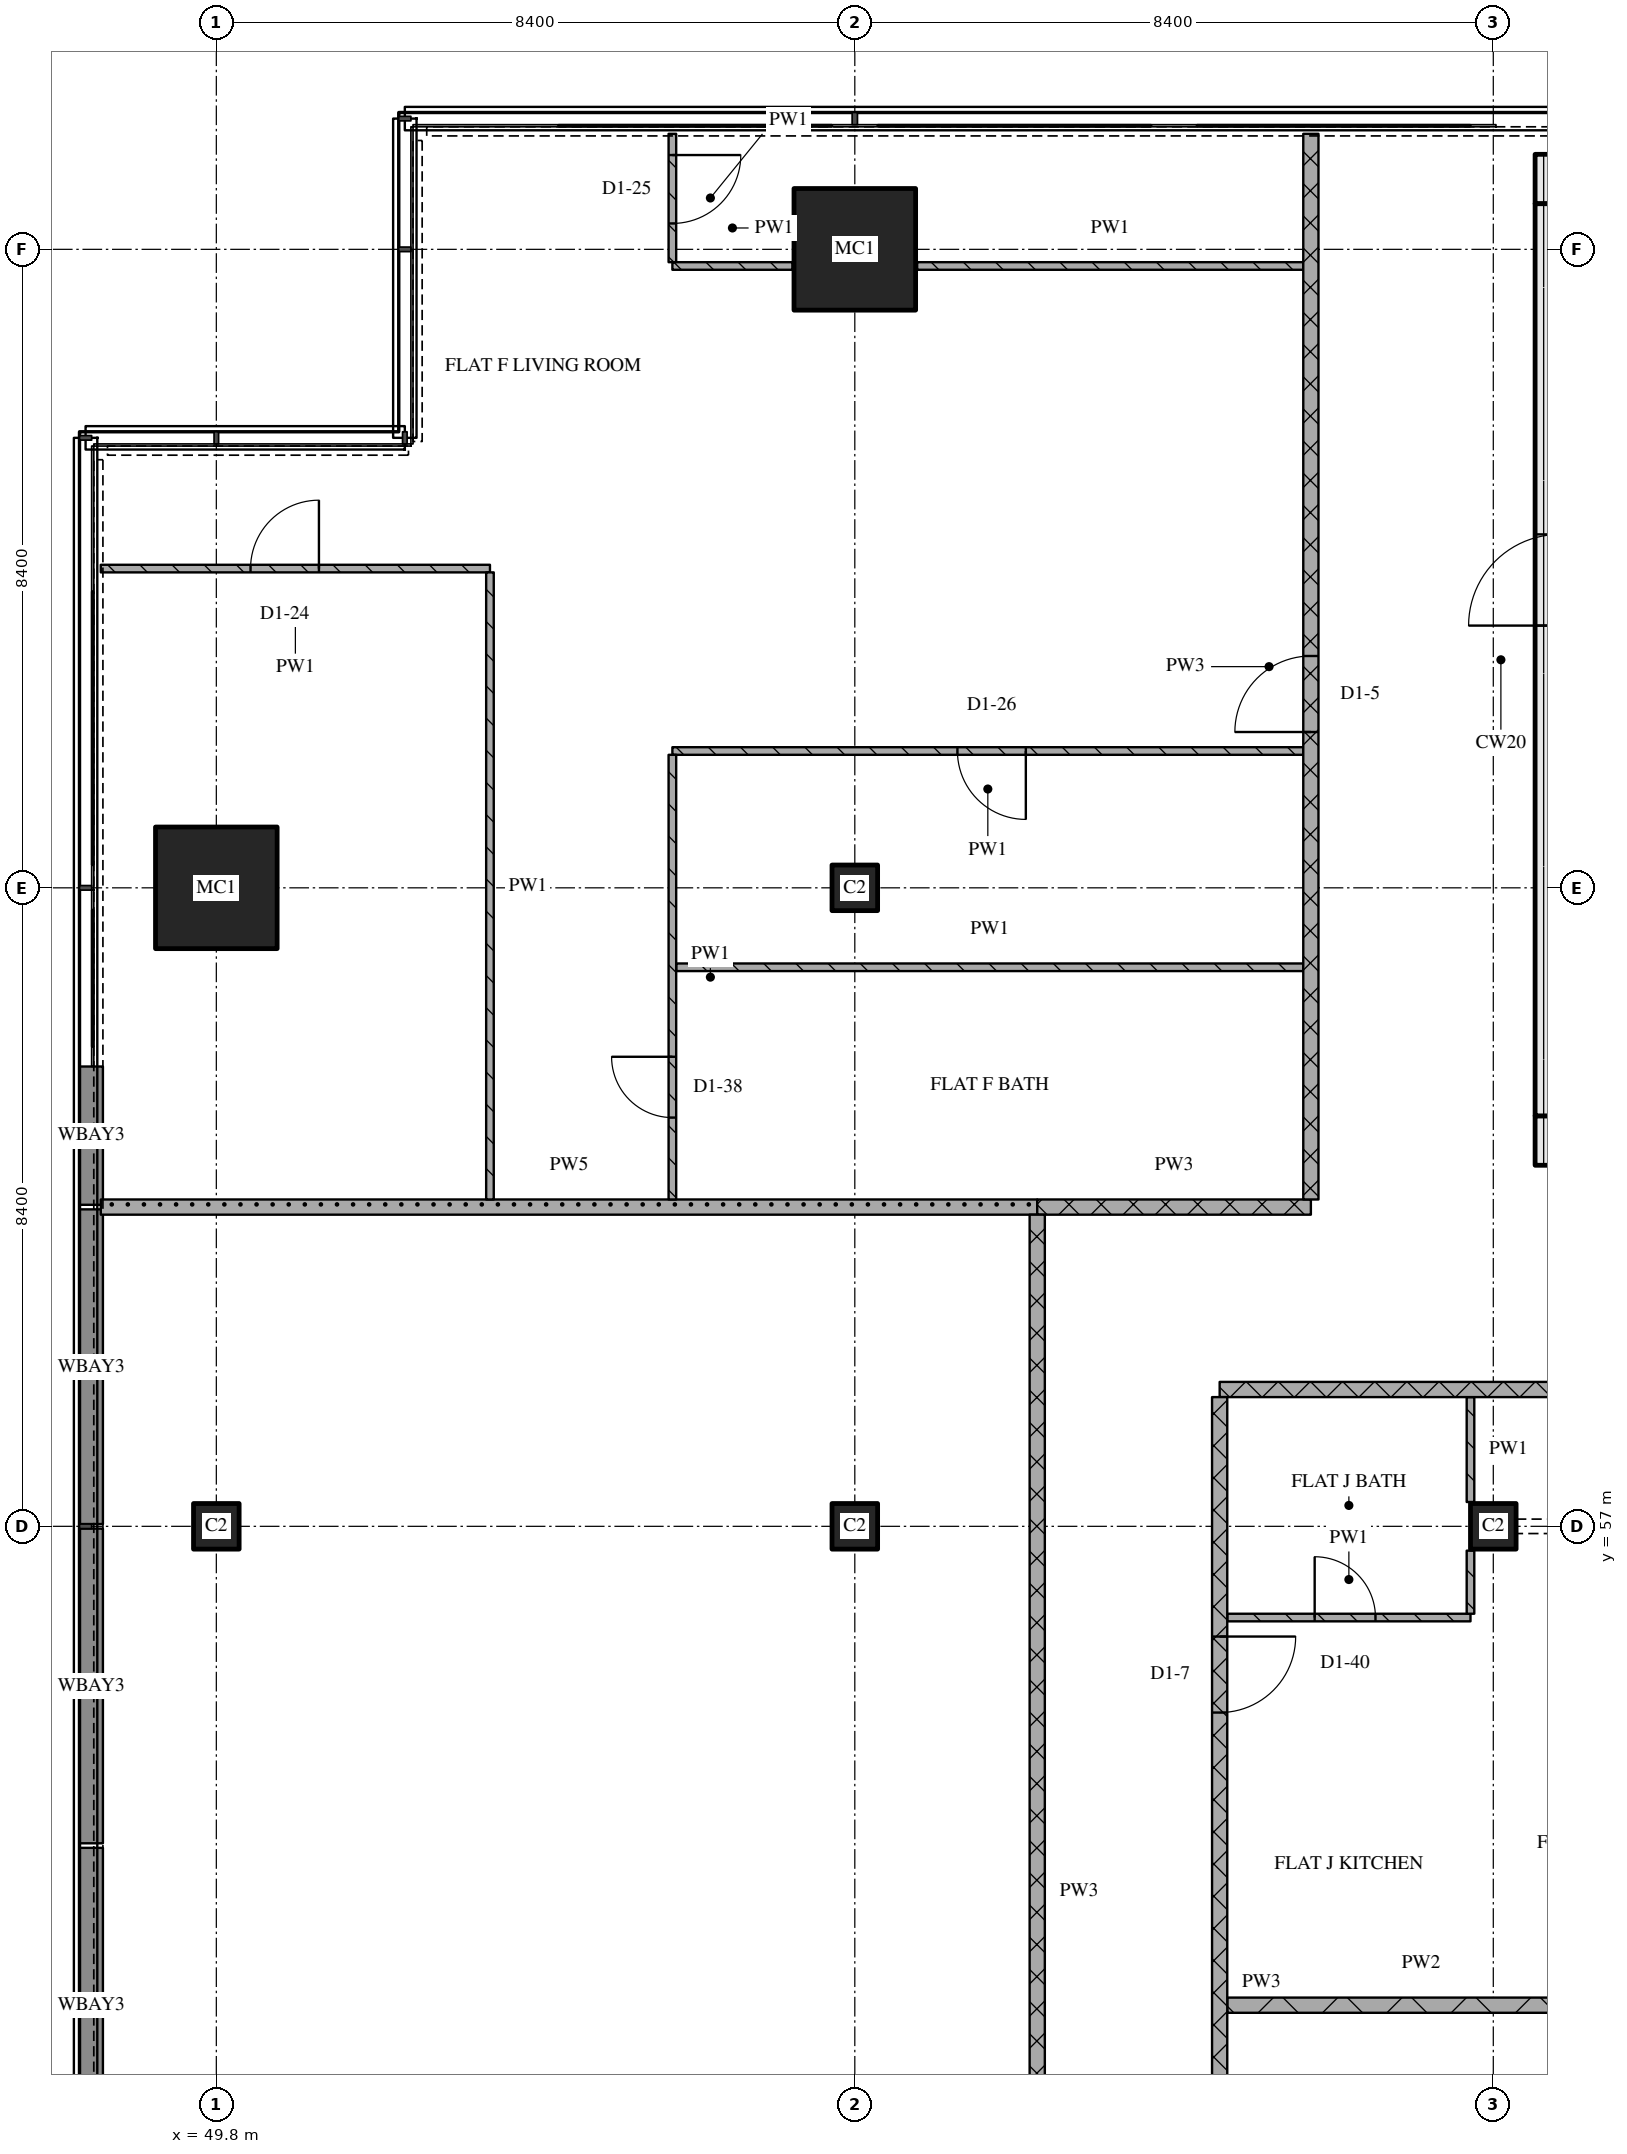
"""IFC4 building model, lengths in metres.
Left out: names, types, materials, properties, quantities, classifications, styles, units other than length and angle.
Written with IfcOpenShell. Run it as: python <this file> out.ifc"""

import sys

from ifc_helpers import new_model, si_unit, direction, frame, frame_2d, origin, origin_2d, place, context, subcontext, project, spatial, rectangle, extrude, element, fill, save


model = new_model("IFC4")
c1 = context("Model", 3, precision=1e-05, world=origin(), true_north=direction((0.0, 1.0)))
c2 = subcontext(c1, "Body", "Model", "MODEL_VIEW")
j1 = project(units=[si_unit("LENGTHUNIT", "METRE"), si_unit("PLANEANGLEUNIT", "RADIAN")], contexts=[c1])
p1 = place(None, origin())
s1 = spatial("IfcSite", under=j1, at=p1, CompositionType="ELEMENT")
p2 = place(p1, origin())
s2 = spatial("IfcBuilding", under=s1, at=p2, CompositionType="ELEMENT")
p3 = place(p2, frame((0.0, 0.0, 205.5)))
s3 = spatial("IfcBuildingStorey", under=s2, at=p3, CompositionType="ELEMENT", Elevation=205.5)
p4 = place(p3, frame((49.8, 57.0, 0.0), z_axis=(0.0, 0.0, 1.0), x_axis=(1.0, 0.0, 0.0)))
e1 = element("IfcColumn", 1, at=p4, inside=s3, PredefinedType="COLUMN", context=c2, shape_type="SweptSolid", body=[
    extrude(rectangle(XDim=0.6, YDim=0.6, at=origin_2d()), origin(), (0.0, 0.0, 1.0), 3.6),
])
p5 = place(p3, frame((49.8, 65.4, 0.0), z_axis=(0.0, 0.0, 1.0), x_axis=(1.0, 0.0, 0.0)))
e2 = element("IfcColumn", 2, at=p5, inside=s3, PredefinedType="COLUMN", context=c2, shape_type="SweptSolid", body=[
    extrude(rectangle(XDim=1.6, YDim=1.6, at=origin_2d()), origin(), (0.0, 0.0, 1.0), 3.6),
])
for number, where, z_axis, x_axis in (
    (3, (58.2, 57.0, 0.0), (0.0, 0.0, 1.0), (1.0, 0.0, 0.0)),
    (4, (58.2, 65.4, 0.0), (0.0, 0.0, 1.0), (1.0, 0.0, 0.0)),
):
    element("IfcColumn", number, at=place(p3, frame(where, z_axis=z_axis, x_axis=x_axis)), inside=s3, PredefinedType="COLUMN", context=c2, shape_type="SweptSolid", body=[
        extrude(rectangle(XDim=0.6, YDim=0.6, at=origin_2d()), origin(), (0.0, 0.0, 1.0), 3.6),
    ])
p6 = place(p3, frame((58.2, 73.8, 0.0), z_axis=(0.0, 0.0, 1.0), x_axis=(1.0, 0.0, 0.0)))
e5 = element("IfcColumn", 5, at=p6, inside=s3, PredefinedType="COLUMN", context=c2, shape_type="SweptSolid", body=[
    extrude(rectangle(XDim=1.6, YDim=1.6, at=origin_2d()), origin(), (0.0, 0.0, 1.0), 3.6),
])
p7 = place(p3, frame((66.6, 57.0, 0.0), z_axis=(0.0, 0.0, 1.0), x_axis=(1.0, 0.0, 0.0)))
e6 = element("IfcColumn", 6, at=p7, inside=s3, PredefinedType="COLUMN", context=c2, shape_type="SweptSolid", body=[
    extrude(rectangle(XDim=0.6, YDim=0.6, at=origin_2d()), origin(), (0.0, 0.0, 1.0), 3.6),
])
p8 = place(p3, frame((48.154, 61.23, 0.0), z_axis=(0.0, 0.0, 1.0), x_axis=(0.0, 1.0, 0.0)))
e7 = element("IfcWall", 7, at=p8, inside=s3, PredefinedType="SOLIDWALL", context=c2, shape_type="SweptSolid", body=[
    extrude(rectangle(XDim=1.819, YDim=0.308, at=frame_2d((0.91, 0.0))), origin(), (0.0, 0.0, 1.0), 3.2),
])
for number, where, z_axis, x_axis in (
    (8, (48.154, 57.03, 0.0), (0.0, 0.0, 1.0), (0.0, 1.0, 0.0)),
    (9, (48.154, 52.83, 0.0), (0.0, 0.0, 1.0), (0.0, 1.0, 0.0)),
):
    element("IfcWall", number, at=place(p3, frame(where, z_axis=z_axis, x_axis=x_axis)), inside=s3, PredefinedType="SOLIDWALL", context=c2, shape_type="SweptSolid", body=[
        extrude(rectangle(XDim=4.14, YDim=0.308, at=frame_2d((2.07, 0.0))), origin(), (0.0, 0.0, 1.0), 3.2),
    ])
p9 = place(p3, frame((48.154, 48.63, 0.0), z_axis=(0.0, 0.0, 1.0), x_axis=(0.0, 1.0, 0.0)))
e10 = element("IfcWall", 10, at=p9, inside=s3, PredefinedType="SOLIDWALL", context=c2, shape_type="SweptSolid", body=[
    extrude(rectangle(XDim=4.14, YDim=0.308, at=frame_2d((2.07, 0.0))), origin(), (0.0, 0.0, 1.0), 3.2),
])
p10 = place(p3, frame((67.15, 62.075, 0.0), z_axis=(0.0, 0.0, 1.0), x_axis=(1.0, 0.0, 0.0)))
e11 = element("IfcWall", 11, at=p10, inside=s3, PredefinedType="SOLIDWALL", context=c2, shape_type="SweptSolid", body=[
    extrude(rectangle(XDim=40.9, YDim=0.65, at=frame_2d((20.45, 0.0))), origin(), (0.0, 0.0, 1.0), 3.32),
])
p11 = place(p10, frame((20.8, 0.0, 0.0)))
e12 = element("IfcOpeningElement", 12, at=p11, cuts=e11, PredefinedType="OPENING", context=c2, shape_type="SweptSolid", body=[
    extrude(rectangle(XDim=1.8, YDim=2.1, at=frame_2d((0.9, 1.05))), frame((0.0, 0.335, 0.0), z_axis=(0.0, -1.0, 0.0), x_axis=(1.0, 0.0, 0.0)), (0.0, 0.0, 1.0), 0.67),
])
p12 = place(p3, frame((67.15, 74.725, 0.0), z_axis=(0.0, 0.0, 1.0), x_axis=(1.0, 0.0, 0.0)))
e13 = element("IfcWall", 13, at=p12, inside=s3, PredefinedType="SOLIDWALL", context=c2, shape_type="SweptSolid", body=[
    extrude(rectangle(XDim=40.9, YDim=0.65, at=frame_2d((20.45, 0.0))), origin(), (0.0, 0.0, 1.0), 3.32),
])
p13 = place(p3, frame((67.475, 62.4, 0.0), z_axis=(0.0, 0.0, 1.0), x_axis=(0.0, 1.0, 0.0)))
e14 = element("IfcWall", 14, at=p13, inside=s3, PredefinedType="SOLIDWALL", context=c2, shape_type="SweptSolid", body=[
    extrude(rectangle(XDim=12.0, YDim=0.65, at=frame_2d((6.0, 0.0))), origin(), (0.0, 0.0, 1.0), 3.32),
])
p14 = place(p13, frame((6.45, 0.0, 0.0)))
e15 = element("IfcOpeningElement", 15, at=p14, cuts=e14, PredefinedType="OPENING", context=c2, shape_type="SweptSolid", body=[
    extrude(rectangle(XDim=1.2, YDim=2.1, at=frame_2d((0.6, 1.05))), frame((0.0, 0.335, 0.0), z_axis=(0.0, -1.0, 0.0), x_axis=(1.0, 0.0, 0.0)), (0.0, 0.0, 1.0), 0.67),
])
p15 = place(p3, frame((63.1, 50.7, 0.0), z_axis=(0.0, 0.0, 1.0), x_axis=(1.0, 0.0, 0.0)))
e16 = element("IfcWall", 16, at=p15, inside=s3, PredefinedType="PARTITIONING", context=c2, shape_type="SweptSolid", body=[
    extrude(rectangle(XDim=5.1, YDim=0.2, at=frame_2d((2.55, 0.0))), origin(), (0.0, 0.0, 1.0), 3.32),
])
p16 = place(p3, frame((63.1, 55.8, 0.0), z_axis=(0.0, 0.0, 1.0), x_axis=(1.0, 0.0, 0.0)))
e17 = element("IfcWall", 17, at=p16, inside=s3, PredefinedType="PARTITIONING", context=c2, shape_type="SweptSolid", body=[
    extrude(rectangle(XDim=3.2, YDim=0.1, at=frame_2d((1.6, 0.0))), origin(), (0.0, 0.0, 1.0), 3.32),
])
p17 = place(p16, frame((1.15, 0.0, 0.0)))
e18 = element("IfcOpeningElement", 18, at=p17, cuts=e17, PredefinedType="OPENING", context=c2, shape_type="SweptSolid", body=[
    extrude(rectangle(XDim=0.8, YDim=2.1, at=frame_2d((0.4, 1.05))), frame((0.0, 0.06, 0.0), z_axis=(0.0, -1.0, 0.0), x_axis=(1.0, 0.0, 0.0)), (0.0, 0.0, 1.0), 0.12),
])
p18 = place(p3, frame((63.0, 58.8, 0.0), z_axis=(0.0, 0.0, 1.0), x_axis=(1.0, 0.0, 0.0)))
e19 = element("IfcWall", 19, at=p18, inside=s3, PredefinedType="PARTITIONING", context=c2, shape_type="SweptSolid", body=[
    extrude(rectangle(XDim=10.8, YDim=0.2, at=frame_2d((5.4, 0.0))), origin(), (0.0, 0.0, 1.0), 3.32),
])
p19 = place(p3, frame((60.6, 61.2, 0.0), z_axis=(0.0, 0.0, 1.0), x_axis=(1.0, 0.0, 0.0)))
e20 = element("IfcWall", 20, at=p19, inside=s3, PredefinedType="PARTITIONING", context=c2, shape_type="SweptSolid", body=[
    extrude(rectangle(XDim=3.6, YDim=0.2, at=frame_2d((1.8, 0.0))), origin(), (0.0, 0.0, 1.0), 3.32),
])
p20 = place(p3, frame((48.28, 61.2, 0.0), z_axis=(0.0, 0.0, 1.0), x_axis=(1.0, 0.0, 0.0)))
e21 = element("IfcWall", 21, at=p20, inside=s3, PredefinedType="PARTITIONING", context=c2, shape_type="SweptSolid", body=[
    extrude(rectangle(XDim=12.32, YDim=0.2, at=frame_2d((6.16, 0.0))), origin(), (0.0, 0.0, 1.0), 3.32),
])
p21 = place(p3, frame((55.85, 64.355, 0.0), z_axis=(0.0, 0.0, 1.0), x_axis=(1.0, 0.0, 0.0)))
e22 = element("IfcWall", 22, at=p21, inside=s3, PredefinedType="PARTITIONING", context=c2, shape_type="SweptSolid", body=[
    extrude(rectangle(XDim=8.25, YDim=0.1, at=frame_2d((4.125, 0.0))), origin(), (0.0, 0.0, 1.0), 3.32),
])
p22 = place(p3, frame((64.1, 67.2, 0.0), z_axis=(0.0, 0.0, 1.0), x_axis=(-1.0, 0.0, 0.0)))
e23 = element("IfcWall", 23, at=p22, inside=s3, PredefinedType="PARTITIONING", context=c2, shape_type="SweptSolid", body=[
    extrude(rectangle(XDim=8.3, YDim=0.1, at=frame_2d((4.15, 0.0))), origin(), (0.0, 0.0, 1.0), 3.32),
])
p23 = place(p22, frame((3.65, 0.0, 0.0)))
e24 = element("IfcOpeningElement", 24, at=p23, cuts=e23, PredefinedType="OPENING", context=c2, shape_type="SweptSolid", body=[
    extrude(rectangle(XDim=0.9, YDim=2.1, at=frame_2d((0.45, 1.05))), frame((0.0, 0.06, 0.0), z_axis=(0.0, -1.0, 0.0), x_axis=(1.0, 0.0, 0.0)), (0.0, 0.0, 1.0), 0.12),
])
p24 = place(p3, frame((53.4, 69.6, 0.0), z_axis=(0.0, 0.0, 1.0), x_axis=(-1.0, 0.0, 0.0)))
e25 = element("IfcWall", 25, at=p24, inside=s3, PredefinedType="PARTITIONING", context=c2, shape_type="SweptSolid", body=[
    extrude(rectangle(XDim=5.12, YDim=0.1, at=frame_2d((2.56, 0.0))), origin(), (0.0, 0.0, 1.0), 3.32),
])
p25 = place(p24, frame((2.25, 0.0, 0.0)))
e26 = element("IfcOpeningElement", 26, at=p25, cuts=e25, PredefinedType="OPENING", context=c2, shape_type="SweptSolid", body=[
    extrude(rectangle(XDim=0.9, YDim=2.1, at=frame_2d((0.45, 1.05))), frame((0.0, 0.06, 0.0), z_axis=(0.0, -1.0, 0.0), x_axis=(1.0, 0.0, 0.0)), (0.0, 0.0, 1.0), 0.12),
])
p26 = place(p3, frame((55.8, 73.581, 0.0), z_axis=(0.0, 0.0, 1.0), x_axis=(1.0, 0.0, 0.0)))
e27 = element("IfcWall", 27, at=p26, inside=s3, PredefinedType="PARTITIONING", context=c2, shape_type="SweptSolid", body=[
    extrude(rectangle(XDim=1.58, YDim=0.1, at=frame_2d((0.79, 0.0))), origin(), (0.0, 0.0, 1.0), 3.32),
])
p27 = place(p3, frame((59.02, 73.581, 0.0), z_axis=(0.0, 0.0, 1.0), x_axis=(1.0, 0.0, 0.0)))
e28 = element("IfcWall", 28, at=p27, inside=s3, PredefinedType="PARTITIONING", context=c2, shape_type="SweptSolid", body=[
    extrude(rectangle(XDim=5.08, YDim=0.1, at=frame_2d((2.54, 0.0))), origin(), (0.0, 0.0, 1.0), 3.32),
])
p28 = place(p3, frame((53.4, 69.55, 0.0), z_axis=(0.0, 0.0, 1.0), x_axis=(0.0, -1.0, 0.0)))
e29 = element("IfcWall", 29, at=p28, inside=s3, PredefinedType="PARTITIONING", context=c2, shape_type="SweptSolid", body=[
    extrude(rectangle(XDim=8.25, YDim=0.1, at=frame_2d((4.125, 0.0))), origin(), (0.0, 0.0, 1.0), 3.32),
])
p29 = place(p3, frame((55.8, 67.15, 0.0), z_axis=(0.0, 0.0, 1.0), x_axis=(0.0, -1.0, 0.0)))
e30 = element("IfcWall", 30, at=p29, inside=s3, PredefinedType="PARTITIONING", context=c2, shape_type="SweptSolid", body=[
    extrude(rectangle(XDim=5.85, YDim=0.1, at=frame_2d((2.925, 0.0))), origin(), (0.0, 0.0, 1.0), 3.32),
])
p30 = place(p29, frame((3.973, 0.0, 0.0)))
e31 = element("IfcOpeningElement", 31, at=p30, cuts=e30, PredefinedType="OPENING", context=c2, shape_type="SweptSolid", body=[
    extrude(rectangle(XDim=0.8, YDim=2.1, at=frame_2d((0.4, 1.05))), frame((0.0, 0.06, 0.0), z_axis=(0.0, -1.0, 0.0), x_axis=(1.0, 0.0, 0.0)), (0.0, 0.0, 1.0), 0.12),
])
p31 = place(p3, frame((55.8, 75.32, 0.0), z_axis=(0.0, 0.0, 1.0), x_axis=(0.0, -1.0, 0.0)))
e32 = element("IfcWall", 32, at=p31, inside=s3, PredefinedType="PARTITIONING", context=c2, shape_type="SweptSolid", body=[
    extrude(rectangle(XDim=1.689, YDim=0.1, at=frame_2d((0.844, 0.0))), origin(), (0.0, 0.0, 1.0), 3.32),
])
p32 = place(p31, frame((0.28, 0.0, 0.0)))
e33 = element("IfcOpeningElement", 33, at=p32, cuts=e32, PredefinedType="OPENING", context=c2, shape_type="SweptSolid", body=[
    extrude(rectangle(XDim=0.9, YDim=2.1, at=frame_2d((0.45, 1.05))), frame((0.0, 0.06, 0.0), z_axis=(0.0, -1.0, 0.0), x_axis=(1.0, 0.0, 0.0)), (0.0, 0.0, 1.0), 0.12),
])
p33 = place(p3, frame((60.6, 61.1, 0.0), z_axis=(0.0, 0.0, 1.0), x_axis=(0.0, -1.0, 0.0)))
e34 = element("IfcWall", 34, at=p33, inside=s3, PredefinedType="PARTITIONING", context=c2, shape_type="SweptSolid", body=[
    extrude(rectangle(XDim=17.8, YDim=0.2, at=frame_2d((8.9, 0.0))), origin(), (0.0, 0.0, 1.0), 3.32),
])
p34 = place(p3, frame((63.0, 58.7, 0.0), z_axis=(0.0, 0.0, 1.0), x_axis=(0.0, -1.0, 0.0)))
e35 = element("IfcWall", 35, at=p34, inside=s3, PredefinedType="PARTITIONING", context=c2, shape_type="SweptSolid", body=[
    extrude(rectangle(XDim=15.4, YDim=0.2, at=frame_2d((7.7, 0.0))), origin(), (0.0, 0.0, 1.0), 3.32),
])
p35 = place(p34, frame((3.15, 0.0, 0.0)))
e36 = element("IfcOpeningElement", 36, at=p35, cuts=e35, PredefinedType="OPENING", context=c2, shape_type="SweptSolid", body=[
    extrude(rectangle(XDim=1.0, YDim=2.1, at=frame_2d((0.5, 1.05))), frame((0.0, 0.11, 0.0), z_axis=(0.0, -1.0, 0.0), x_axis=(1.0, 0.0, 0.0)), (0.0, 0.0, 1.0), 0.22),
])
p36 = place(p34, frame((11.25, 0.0, 0.0)))
e37 = element("IfcOpeningElement", 37, at=p36, cuts=e35, PredefinedType="OPENING", context=c2, shape_type="SweptSolid", body=[
    extrude(rectangle(XDim=0.9, YDim=2.1, at=frame_2d((0.45, 1.05))), frame((0.0, 0.11, 0.0), z_axis=(0.0, -1.0, 0.0), x_axis=(1.0, 0.0, 0.0)), (0.0, 0.0, 1.0), 0.22),
])
p37 = place(p3, frame((64.2, 61.3, 0.0), z_axis=(0.0, 0.0, 1.0), x_axis=(0.0, 1.0, 0.0)))
e38 = element("IfcWall", 38, at=p37, inside=s3, PredefinedType="PARTITIONING", context=c2, shape_type="SweptSolid", body=[
    extrude(rectangle(XDim=14.02, YDim=0.2, at=frame_2d((7.01, 0.0))), origin(), (0.0, 0.0, 1.0), 3.32),
])
p38 = place(p37, frame((6.15, 0.0, 0.0)))
e39 = element("IfcOpeningElement", 39, at=p38, cuts=e38, PredefinedType="OPENING", context=c2, shape_type="SweptSolid", body=[
    extrude(rectangle(XDim=1.0, YDim=2.1, at=frame_2d((0.5, 1.05))), frame((0.0, 0.11, 0.0), z_axis=(0.0, -1.0, 0.0), x_axis=(1.0, 0.0, 0.0)), (0.0, 0.0, 1.0), 0.22),
])
p39 = place(p3, frame((66.3, 56.68, 0.0), z_axis=(0.0, 0.0, 1.0), x_axis=(0.0, -1.0, 0.0)))
e40 = element("IfcWall", 40, at=p39, inside=s3, PredefinedType="PARTITIONING", context=c2, shape_type="SweptSolid", body=[
    extrude(rectangle(XDim=0.83, YDim=0.1, at=frame_2d((0.415, 0.0))), origin(), (0.0, 0.0, 1.0), 3.32),
])
p40 = place(p3, frame((66.3, 58.7, 0.0), z_axis=(0.0, 0.0, 1.0), x_axis=(0.0, -1.0, 0.0)))
e41 = element("IfcWall", 41, at=p40, inside=s3, PredefinedType="PARTITIONING", context=c2, shape_type="SweptSolid", body=[
    extrude(rectangle(XDim=1.38, YDim=0.1, at=frame_2d((0.69, 0.0))), origin(), (0.0, 0.0, 1.0), 3.32),
])
p41 = place(p17, origin())
e42 = element("IfcDoor", 42, at=p41, inside=s3, OperationType="SINGLE_SWING_LEFT", PredefinedType="DOOR", context=c2, shape_type="SweptSolid", body=[
    extrude(rectangle(XDim=0.8, YDim=2.1, at=frame_2d((0.4, 1.05))), frame((0.0, 0.025, 0.0), z_axis=(0.0, -1.0, 0.0), x_axis=(1.0, 0.0, 0.0)), (0.0, 0.0, 1.0), 0.05),
])
fill(e18, e42)
p42 = place(p23, origin())
e43 = element("IfcDoor", 43, at=p42, inside=s3, OperationType="SINGLE_SWING_LEFT", PredefinedType="DOOR", context=c2, shape_type="SweptSolid", body=[
    extrude(rectangle(XDim=0.9, YDim=2.1, at=frame_2d((0.45, 1.05))), frame((0.0, 0.025, 0.0), z_axis=(0.0, -1.0, 0.0), x_axis=(1.0, 0.0, 0.0)), (0.0, 0.0, 1.0), 0.05),
])
fill(e24, e43)
p43 = place(p25, origin())
e44 = element("IfcDoor", 44, at=p43, inside=s3, OperationType="SINGLE_SWING_RIGHT", PredefinedType="DOOR", context=c2, shape_type="SweptSolid", body=[
    extrude(rectangle(XDim=0.9, YDim=2.1, at=frame_2d((0.45, 1.05))), frame((0.0, 0.025, 0.0), z_axis=(0.0, -1.0, 0.0), x_axis=(1.0, 0.0, 0.0)), (0.0, 0.0, 1.0), 0.05),
])
fill(e26, e44)
p44 = place(p30, origin())
e45 = element("IfcDoor", 45, at=p44, inside=s3, OperationType="SINGLE_SWING_RIGHT", PredefinedType="DOOR", context=c2, shape_type="SweptSolid", body=[
    extrude(rectangle(XDim=0.8, YDim=2.1, at=frame_2d((0.4, 1.05))), frame((0.0, 0.025, 0.0), z_axis=(0.0, -1.0, 0.0), x_axis=(1.0, 0.0, 0.0)), (0.0, 0.0, 1.0), 0.05),
])
fill(e31, e45)
p45 = place(p32, origin())
e46 = element("IfcDoor", 46, at=p45, inside=s3, OperationType="SINGLE_SWING_LEFT", PredefinedType="DOOR", context=c2, shape_type="SweptSolid", body=[
    extrude(rectangle(XDim=0.9, YDim=2.1, at=frame_2d((0.45, 1.05))), frame((0.0, 0.025, 0.0), z_axis=(0.0, -1.0, 0.0), x_axis=(1.0, 0.0, 0.0)), (0.0, 0.0, 1.0), 0.05),
])
fill(e33, e46)
p46 = place(p35, origin())
e47 = element("IfcDoor", 47, at=p46, inside=s3, OperationType="SINGLE_SWING_LEFT", PredefinedType="DOOR", context=c2, shape_type="SweptSolid", body=[
    extrude(rectangle(XDim=1.0, YDim=2.1, at=frame_2d((0.5, 1.05))), frame((0.0, 0.025, 0.0), z_axis=(0.0, -1.0, 0.0), x_axis=(1.0, 0.0, 0.0)), (0.0, 0.0, 1.0), 0.05),
])
fill(e36, e47)
p47 = place(p38, origin())
e48 = element("IfcDoor", 48, at=p47, inside=s3, OperationType="SINGLE_SWING_LEFT", PredefinedType="DOOR", context=c2, shape_type="SweptSolid", body=[
    extrude(rectangle(XDim=1.0, YDim=2.1, at=frame_2d((0.5, 1.05))), frame((0.0, 0.025, 0.0), z_axis=(0.0, -1.0, 0.0), x_axis=(1.0, 0.0, 0.0)), (0.0, 0.0, 1.0), 0.05),
])
fill(e39, e48)
save(model, sys.argv[1])
